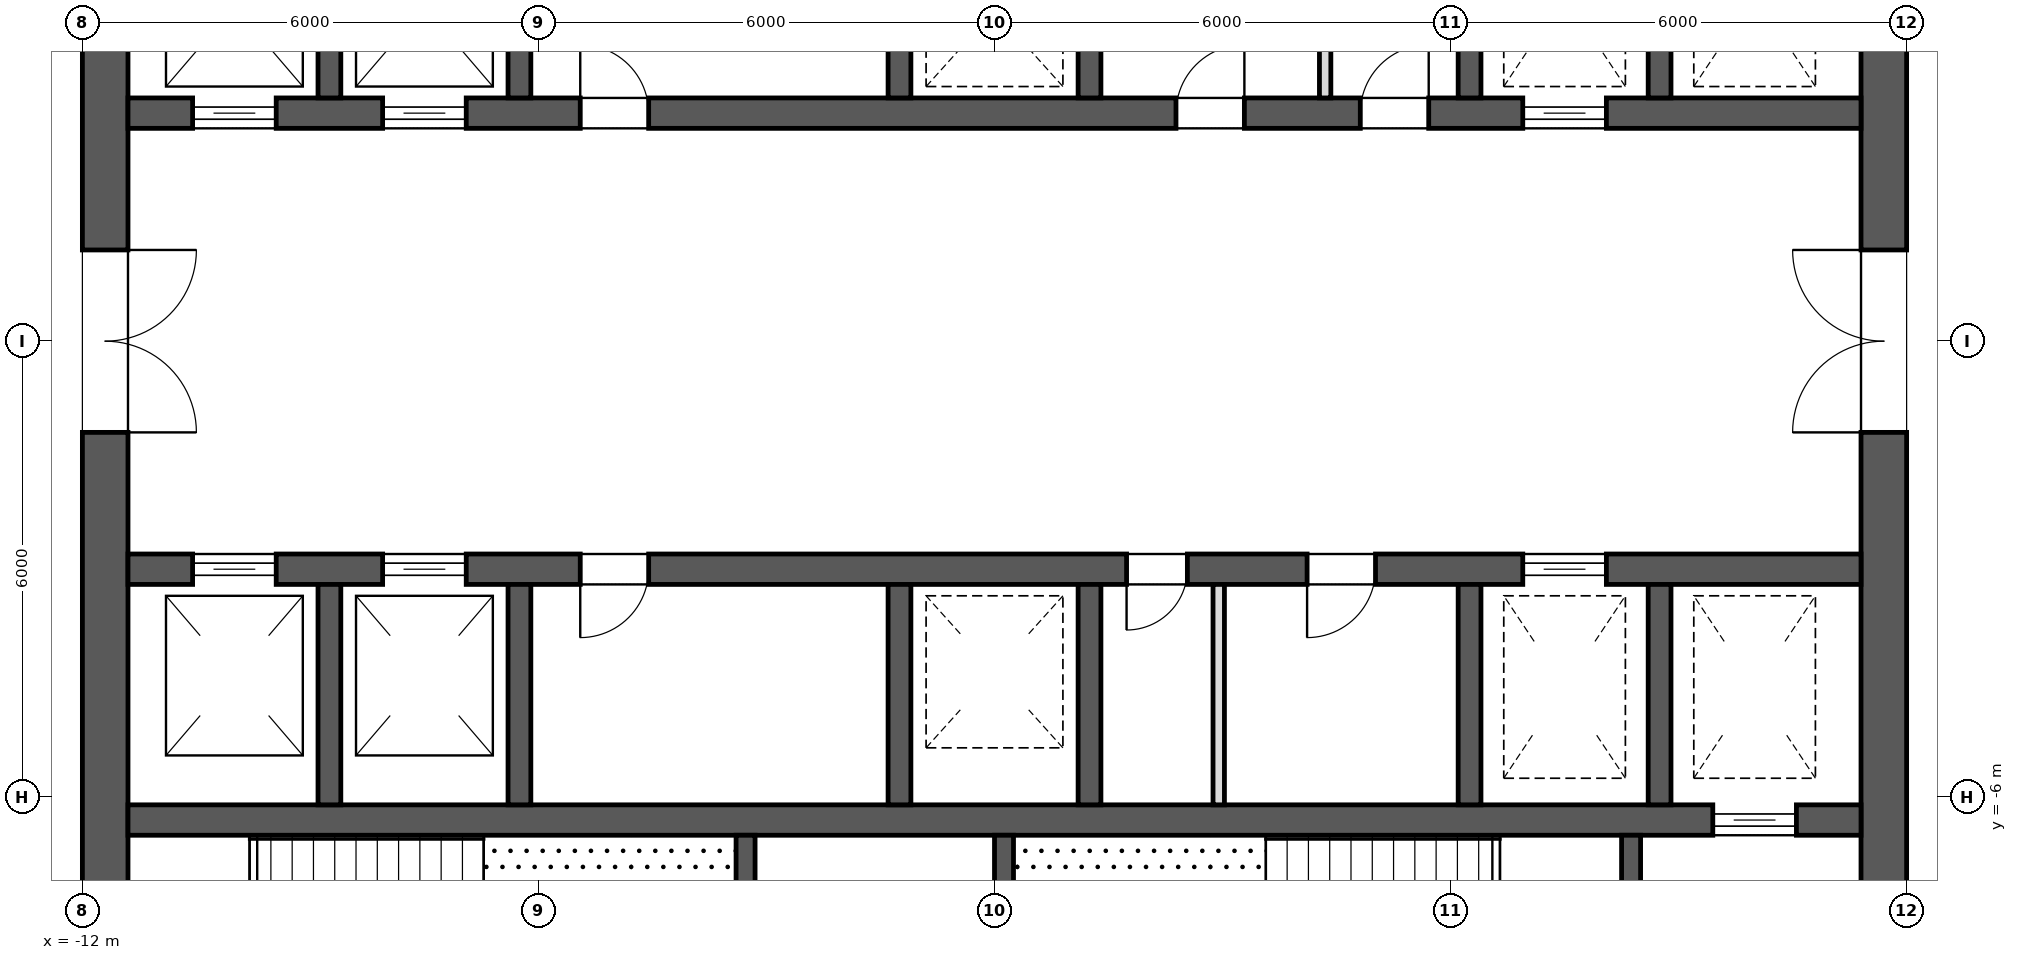
"""IFC4 building model, lengths in metres.
Left out: names, types, materials, properties, quantities, classifications, styles, units other than length and angle.
Written with IfcOpenShell. Run it as: python <this file> out.ifc"""

import sys

from ifc_helpers import new_model, si_unit, direction, frame, frame_2d, origin, place, context, subcontext, project, spatial, rectangle, extrude, element, fill, save


model = new_model("IFC4")
c1 = context("Model", 3, precision=1e-05, world=origin(), true_north=direction((0.0, 1.0)))
c2 = subcontext(c1, "Body", "Model", "MODEL_VIEW")
j1 = project(units=[si_unit("LENGTHUNIT", "METRE"), si_unit("PLANEANGLEUNIT", "RADIAN")], contexts=[c1])
p1 = place(None, origin())
s1 = spatial("IfcSite", under=j1, at=p1, CompositionType="ELEMENT")
p2 = place(p1, origin())
s2 = spatial("IfcBuilding", under=s1, at=p2, CompositionType="ELEMENT")
p3 = place(p2, frame((0.0, 0.0, 276.3)))
s3 = spatial("IfcBuildingStorey", under=s2, at=p3, CompositionType="ELEMENT", Elevation=276.3)
p4 = place(p3, frame((11.7, -11.4, 0.0), z_axis=(0.0, 0.0, 1.0), x_axis=(0.0, 1.0, 0.0)))
e1 = element("IfcWall", 1, at=p4, inside=s3, PredefinedType="SHEAR", context=c2, shape_type="SweptSolid", body=[
    extrude(rectangle(XDim=22.8, YDim=0.6, at=frame_2d((11.4, 0.0))), origin(), (0.0, 0.0, 1.0), 4.0),
])
p5 = place(p4, frame((10.2, 0.0, 0.0)))
e2 = element("IfcOpeningElement", 2, at=p5, cuts=e1, PredefinedType="OPENING", context=c2, shape_type="SweptSolid", body=[
    extrude(rectangle(XDim=2.4, YDim=2.1, at=frame_2d((1.2, 1.05))), frame((0.0, 0.312, 0.0), z_axis=(0.0, -1.0, 0.0), x_axis=(1.0, 0.0, 0.0)), (0.0, 0.0, 1.0), 0.624),
])
p6 = place(p4, frame((19.5, 0.0, 0.0)))
e3 = element("IfcOpeningElement", 3, at=p6, cuts=e1, PredefinedType="OPENING", context=c2, shape_type="SweptSolid", body=[
    extrude(rectangle(XDim=1.2, YDim=2.1, at=frame_2d((0.6, 1.05))), frame((0.0, 0.312, 0.0), z_axis=(0.0, -1.0, 0.0), x_axis=(1.0, 0.0, 0.0)), (0.0, 0.0, 1.0), 0.624),
])
p7 = place(p4, frame((2.1, 0.0, 0.0)))
e4 = element("IfcOpeningElement", 4, at=p7, cuts=e1, PredefinedType="OPENING", context=c2, shape_type="SweptSolid", body=[
    extrude(rectangle(XDim=1.2, YDim=2.1, at=frame_2d((0.6, 1.05))), frame((0.0, 0.312, 0.0), z_axis=(0.0, -1.0, 0.0), x_axis=(1.0, 0.0, 0.0)), (0.0, 0.0, 1.0), 0.624),
])
p8 = place(p3, frame((-11.7, -11.4, 0.0), z_axis=(0.0, 0.0, 1.0), x_axis=(0.0, 1.0, 0.0)))
e5 = element("IfcWall", 5, at=p8, inside=s3, PredefinedType="SHEAR", context=c2, shape_type="SweptSolid", body=[
    extrude(rectangle(XDim=22.8, YDim=0.6, at=frame_2d((11.4, 0.0))), origin(), (0.0, 0.0, 1.0), 4.0),
])
p9 = place(p8, frame((10.2, 0.0, 0.0)))
e6 = element("IfcOpeningElement", 6, at=p9, cuts=e5, PredefinedType="OPENING", context=c2, shape_type="SweptSolid", body=[
    extrude(rectangle(XDim=2.4, YDim=2.1, at=frame_2d((1.2, 1.05))), frame((0.0, 0.312, 0.0), z_axis=(0.0, -1.0, 0.0), x_axis=(1.0, 0.0, 0.0)), (0.0, 0.0, 1.0), 0.624),
])
p10 = place(p8, frame((18.925, 0.0, 0.0)))
e7 = element("IfcOpeningElement", 7, at=p10, cuts=e5, PredefinedType="OPENING", context=c2, shape_type="SweptSolid", body=[
    extrude(rectangle(XDim=1.2, YDim=2.1, at=frame_2d((0.6, 1.05))), frame((0.0, 0.312, 0.0), z_axis=(0.0, -1.0, 0.0), x_axis=(1.0, 0.0, 0.0)), (0.0, 0.0, 1.0), 0.624),
])
p11 = place(p8, frame((2.675, 0.0, 0.0)))
e8 = element("IfcOpeningElement", 8, at=p11, cuts=e5, PredefinedType="OPENING", context=c2, shape_type="SweptSolid", body=[
    extrude(rectangle(XDim=1.2, YDim=2.1, at=frame_2d((0.6, 1.05))), frame((0.0, 0.312, 0.0), z_axis=(0.0, -1.0, 0.0), x_axis=(1.0, 0.0, 0.0)), (0.0, 0.0, 1.0), 0.624),
])
p12 = place(p3, frame((-11.4, 3.0, 0.0), z_axis=(0.0, 0.0, 1.0), x_axis=(1.0, 0.0, 0.0)))
e9 = element("IfcWall", 9, at=p12, inside=s3, PredefinedType="SHEAR", context=c2, shape_type="SweptSolid", body=[
    extrude(rectangle(XDim=22.8, YDim=0.4, at=frame_2d((11.4, 0.0))), origin(), (0.0, 0.0, 1.0), 4.0),
])
p13 = place(p12, frame((0.85, 0.0, 0.0)))
e10 = element("IfcOpeningElement", 10, at=p13, cuts=e9, PredefinedType="OPENING", context=c2, shape_type="SweptSolid", body=[
    extrude(rectangle(XDim=1.1, YDim=2.1, at=frame_2d((0.55, 1.05))), frame((0.0, 0.212, 0.0), z_axis=(0.0, -1.0, 0.0), x_axis=(1.0, 0.0, 0.0)), (0.0, 0.0, 1.0), 0.424),
])
p14 = place(p12, frame((3.35, 0.0, 0.0)))
e11 = element("IfcOpeningElement", 11, at=p14, cuts=e9, PredefinedType="OPENING", context=c2, shape_type="SweptSolid", body=[
    extrude(rectangle(XDim=1.1, YDim=2.1, at=frame_2d((0.55, 1.05))), frame((0.0, 0.212, 0.0), z_axis=(0.0, -1.0, 0.0), x_axis=(1.0, 0.0, 0.0)), (0.0, 0.0, 1.0), 0.424),
])
p15 = place(p12, frame((18.35, 0.0, 0.0)))
e12 = element("IfcOpeningElement", 12, at=p15, cuts=e9, PredefinedType="OPENING", context=c2, shape_type="SweptSolid", body=[
    extrude(rectangle(XDim=1.1, YDim=2.1, at=frame_2d((0.55, 1.05))), frame((0.0, 0.212, 0.0), z_axis=(0.0, -1.0, 0.0), x_axis=(1.0, 0.0, 0.0)), (0.0, 0.0, 1.0), 0.424),
])
p16 = place(p12, frame((13.788, 0.0, 0.0)))
e13 = element("IfcOpeningElement", 13, at=p16, cuts=e9, PredefinedType="OPENING", context=c2, shape_type="SweptSolid", body=[
    extrude(rectangle(XDim=0.9, YDim=2.1, at=frame_2d((0.45, 1.05))), frame((0.0, 0.212, 0.0), z_axis=(0.0, -1.0, 0.0), x_axis=(1.0, 0.0, 0.0)), (0.0, 0.0, 1.0), 0.424),
])
p17 = place(p12, frame((16.212, 0.0, 0.0)))
e14 = element("IfcOpeningElement", 14, at=p17, cuts=e9, PredefinedType="OPENING", context=c2, shape_type="SweptSolid", body=[
    extrude(rectangle(XDim=0.9, YDim=2.1, at=frame_2d((0.45, 1.05))), frame((0.0, 0.212, 0.0), z_axis=(0.0, -1.0, 0.0), x_axis=(1.0, 0.0, 0.0)), (0.0, 0.0, 1.0), 0.424),
])
p18 = place(p12, frame((5.95, 0.0, 0.0)))
e15 = element("IfcOpeningElement", 15, at=p18, cuts=e9, PredefinedType="OPENING", context=c2, shape_type="SweptSolid", body=[
    extrude(rectangle(XDim=0.9, YDim=2.1, at=frame_2d((0.45, 1.05))), frame((0.0, 0.212, 0.0), z_axis=(0.0, -1.0, 0.0), x_axis=(1.0, 0.0, 0.0)), (0.0, 0.0, 1.0), 0.424),
])
for number, where, z_axis, x_axis in (
    (16, (-8.75, 3.2, 0.0), (0.0, 0.0, 1.0), (0.0, 1.0, 0.0)),
    (17, (-6.25, 3.2, 0.0), (0.0, 0.0, 1.0), (0.0, 1.0, 0.0)),
    (18, (-1.25, 3.2, 0.0), (0.0, 0.0, 1.0), (0.0, 1.0, 0.0)),
    (19, (1.25, 3.2, 0.0), (0.0, 0.0, 1.0), (0.0, 1.0, 0.0)),
    (20, (6.25, 3.2, 0.0), (0.0, 0.0, 1.0), (0.0, 1.0, 0.0)),
    (21, (8.75, 3.2, 0.0), (0.0, 0.0, 1.0), (0.0, 1.0, 0.0)),
):
    element("IfcWall", number, at=place(p3, frame(where, z_axis=z_axis, x_axis=x_axis)), inside=s3, PredefinedType="SHEAR", context=c2, shape_type="SweptSolid", body=[
        extrude(rectangle(XDim=2.9, YDim=0.3, at=frame_2d((1.45, 0.0))), origin(), (0.0, 0.0, 1.0), 4.0),
    ])
p19 = place(p3, frame((-11.4, -3.0, 0.0), z_axis=(0.0, 0.0, 1.0), x_axis=(1.0, 0.0, 0.0)))
e22 = element("IfcWall", 22, at=p19, inside=s3, PredefinedType="SHEAR", context=c2, shape_type="SweptSolid", body=[
    extrude(rectangle(XDim=22.8, YDim=0.4, at=frame_2d((11.4, 0.0))), origin(), (0.0, 0.0, 1.0), 4.0),
])
p20 = place(p19, frame((0.85, 0.0, 0.0)))
e23 = element("IfcOpeningElement", 23, at=p20, cuts=e22, PredefinedType="OPENING", context=c2, shape_type="SweptSolid", body=[
    extrude(rectangle(XDim=1.1, YDim=2.1, at=frame_2d((0.55, 1.05))), frame((0.0, 0.212, 0.0), z_axis=(0.0, -1.0, 0.0), x_axis=(1.0, 0.0, 0.0)), (0.0, 0.0, 1.0), 0.424),
])
p21 = place(p19, frame((3.35, 0.0, 0.0)))
e24 = element("IfcOpeningElement", 24, at=p21, cuts=e22, PredefinedType="OPENING", context=c2, shape_type="SweptSolid", body=[
    extrude(rectangle(XDim=1.1, YDim=2.1, at=frame_2d((0.55, 1.05))), frame((0.0, 0.212, 0.0), z_axis=(0.0, -1.0, 0.0), x_axis=(1.0, 0.0, 0.0)), (0.0, 0.0, 1.0), 0.424),
])
p22 = place(p19, frame((18.35, 0.0, 0.0)))
e25 = element("IfcOpeningElement", 25, at=p22, cuts=e22, PredefinedType="OPENING", context=c2, shape_type="SweptSolid", body=[
    extrude(rectangle(XDim=1.1, YDim=2.1, at=frame_2d((0.55, 1.05))), frame((0.0, 0.212, 0.0), z_axis=(0.0, -1.0, 0.0), x_axis=(1.0, 0.0, 0.0)), (0.0, 0.0, 1.0), 0.424),
])
p23 = place(p19, frame((13.137, 0.0, 0.0)))
e26 = element("IfcOpeningElement", 26, at=p23, cuts=e22, PredefinedType="OPENING", context=c2, shape_type="SweptSolid", body=[
    extrude(rectangle(XDim=0.8, YDim=2.1, at=frame_2d((0.4, 1.05))), frame((0.0, 0.212, 0.0), z_axis=(0.0, -1.0, 0.0), x_axis=(1.0, 0.0, 0.0)), (0.0, 0.0, 1.0), 0.424),
])
p24 = place(p19, frame((15.512, 0.0, 0.0)))
e27 = element("IfcOpeningElement", 27, at=p24, cuts=e22, PredefinedType="OPENING", context=c2, shape_type="SweptSolid", body=[
    extrude(rectangle(XDim=0.9, YDim=2.1, at=frame_2d((0.45, 1.05))), frame((0.0, 0.212, 0.0), z_axis=(0.0, -1.0, 0.0), x_axis=(1.0, 0.0, 0.0)), (0.0, 0.0, 1.0), 0.424),
])
p25 = place(p19, frame((5.95, 0.0, 0.0)))
e28 = element("IfcOpeningElement", 28, at=p25, cuts=e22, PredefinedType="OPENING", context=c2, shape_type="SweptSolid", body=[
    extrude(rectangle(XDim=0.9, YDim=2.1, at=frame_2d((0.45, 1.05))), frame((0.0, 0.212, 0.0), z_axis=(0.0, -1.0, 0.0), x_axis=(1.0, 0.0, 0.0)), (0.0, 0.0, 1.0), 0.424),
])
p26 = place(p3, frame((-11.4, -6.3, 0.0), z_axis=(0.0, 0.0, 1.0), x_axis=(1.0, 0.0, 0.0)))
e29 = element("IfcWall", 29, at=p26, inside=s3, PredefinedType="SHEAR", context=c2, shape_type="SweptSolid", body=[
    extrude(rectangle(XDim=22.8, YDim=0.4, at=frame_2d((11.4, 0.0))), origin(), (0.0, 0.0, 1.0), 4.0),
])
p27 = place(p26, frame((20.85, 0.0, 0.0)))
e30 = element("IfcOpeningElement", 30, at=p27, cuts=e29, PredefinedType="OPENING", context=c2, shape_type="SweptSolid", body=[
    extrude(rectangle(XDim=1.1, YDim=2.1, at=frame_2d((0.55, 1.05))), frame((0.0, 0.212, 0.0), z_axis=(0.0, -1.0, 0.0), x_axis=(1.0, 0.0, 0.0)), (0.0, 0.0, 1.0), 0.424),
])
for number, where, z_axis, x_axis in (
    (31, (-8.75, -6.1, 0.0), (0.0, 0.0, 1.0), (0.0, 1.0, 0.0)),
    (32, (-6.25, -6.1, 0.0), (0.0, 0.0, 1.0), (0.0, 1.0, 0.0)),
    (33, (-1.25, -6.1, 0.0), (0.0, 0.0, 1.0), (0.0, 1.0, 0.0)),
    (34, (1.25, -6.1, 0.0), (0.0, 0.0, 1.0), (0.0, 1.0, 0.0)),
    (35, (6.25, -6.1, 0.0), (0.0, 0.0, 1.0), (0.0, 1.0, 0.0)),
    (36, (8.75, -6.1, 0.0), (0.0, 0.0, 1.0), (0.0, 1.0, 0.0)),
):
    element("IfcWall", number, at=place(p3, frame(where, z_axis=z_axis, x_axis=x_axis)), inside=s3, PredefinedType="SHEAR", context=c2, shape_type="SweptSolid", body=[
        extrude(rectangle(XDim=2.9, YDim=0.3, at=frame_2d((1.45, 0.0))), origin(), (0.0, 0.0, 1.0), 4.0),
    ])
for number, where, z_axis, x_axis in (
    (37, (-3.275, -11.4, 0.0), (0.0, 0.0, 1.0), (0.0, 1.0, 0.0)),
    (38, (0.125, -11.4, 0.0), (0.0, 0.0, 1.0), (0.0, 1.0, 0.0)),
):
    element("IfcWall", number, at=place(p3, frame(where, z_axis=z_axis, x_axis=x_axis)), inside=s3, PredefinedType="SHEAR", context=c2, shape_type="SweptSolid", body=[
        extrude(rectangle(XDim=4.9, YDim=0.25, at=frame_2d((2.45, 0.0))), origin(), (0.0, 0.0, 1.0), 3.7),
    ])
p28 = place(p3, frame((8.375, -9.9, 0.0), z_axis=(0.0, 0.0, 1.0), x_axis=(0.0, 1.0, 0.0)))
e39 = element("IfcWall", 39, at=p28, inside=s3, PredefinedType="SHEAR", context=c2, shape_type="SweptSolid", body=[
    extrude(rectangle(XDim=3.4, YDim=0.25, at=frame_2d((1.7, 0.0))), origin(), (0.0, 0.0, 1.0), 3.7),
])
p29 = place(p28, frame((1.175, 0.0, 0.0)))
e40 = element("IfcOpeningElement", 40, at=p29, cuts=e39, PredefinedType="OPENING", context=c2, shape_type="SweptSolid", body=[
    extrude(rectangle(XDim=1.2, YDim=2.1, at=frame_2d((0.6, 1.05))), frame((0.0, 0.137, 0.0), z_axis=(0.0, -1.0, 0.0), x_axis=(1.0, 0.0, 0.0)), (0.0, 0.0, 1.0), 0.274),
])
for number, where, z_axis, x_axis in (
    (41, (4.35, 3.2, 0.0), (0.0, 0.0, 1.0), (0.0, 1.0, 0.0)),
    (42, (2.95, -6.1, 0.0), (0.0, 0.0, 1.0), (0.0, 1.0, 0.0)),
):
    element("IfcWall", number, at=place(p3, frame(where, z_axis=z_axis, x_axis=x_axis)), inside=s3, PredefinedType="PARTITIONING", context=c2, shape_type="SweptSolid", body=[
        extrude(rectangle(XDim=2.9, YDim=0.15, at=frame_2d((1.45, 0.0))), origin(), (0.0, 0.0, 1.0), 3.7),
    ])
p30 = place(p27, origin())
e43 = element("IfcDoor", 43, at=p30, inside=s3, OperationType="SLIDING_TO_LEFT", PredefinedType="DOOR", context=c2, shape_type="SweptSolid", body=[
    extrude(rectangle(XDim=1.1, YDim=2.1, at=frame_2d((0.55, 1.05))), frame((0.0, 0.025, 0.0), z_axis=(0.0, -1.0, 0.0), x_axis=(1.0, 0.0, 0.0)), (0.0, 0.0, 1.0), 0.05),
])
fill(e30, e43)
p31 = place(p13, origin())
e44 = element("IfcDoor", 44, at=p31, inside=s3, OperationType="SLIDING_TO_LEFT", PredefinedType="DOOR", context=c2, shape_type="SweptSolid", body=[
    extrude(rectangle(XDim=1.1, YDim=2.1, at=frame_2d((0.55, 1.05))), frame((0.0, 0.025, 0.0), z_axis=(0.0, -1.0, 0.0), x_axis=(1.0, 0.0, 0.0)), (0.0, 0.0, 1.0), 0.05),
])
fill(e10, e44)
p32 = place(p14, origin())
e45 = element("IfcDoor", 45, at=p32, inside=s3, OperationType="SLIDING_TO_LEFT", PredefinedType="DOOR", context=c2, shape_type="SweptSolid", body=[
    extrude(rectangle(XDim=1.1, YDim=2.1, at=frame_2d((0.55, 1.05))), frame((0.0, 0.025, 0.0), z_axis=(0.0, -1.0, 0.0), x_axis=(1.0, 0.0, 0.0)), (0.0, 0.0, 1.0), 0.05),
])
fill(e11, e45)
p33 = place(p20, origin())
e46 = element("IfcDoor", 46, at=p33, inside=s3, OperationType="SLIDING_TO_LEFT", PredefinedType="DOOR", context=c2, shape_type="SweptSolid", body=[
    extrude(rectangle(XDim=1.1, YDim=2.1, at=frame_2d((0.55, 1.05))), frame((0.0, 0.025, 0.0), z_axis=(0.0, -1.0, 0.0), x_axis=(1.0, 0.0, 0.0)), (0.0, 0.0, 1.0), 0.05),
])
fill(e23, e46)
p34 = place(p21, origin())
e47 = element("IfcDoor", 47, at=p34, inside=s3, OperationType="SLIDING_TO_LEFT", PredefinedType="DOOR", context=c2, shape_type="SweptSolid", body=[
    extrude(rectangle(XDim=1.1, YDim=2.1, at=frame_2d((0.55, 1.05))), frame((0.0, 0.025, 0.0), z_axis=(0.0, -1.0, 0.0), x_axis=(1.0, 0.0, 0.0)), (0.0, 0.0, 1.0), 0.05),
])
fill(e24, e47)
p35 = place(p15, origin())
e48 = element("IfcDoor", 48, at=p35, inside=s3, OperationType="SLIDING_TO_LEFT", PredefinedType="DOOR", context=c2, shape_type="SweptSolid", body=[
    extrude(rectangle(XDim=1.1, YDim=2.1, at=frame_2d((0.55, 1.05))), frame((0.0, 0.025, 0.0), z_axis=(0.0, -1.0, 0.0), x_axis=(1.0, 0.0, 0.0)), (0.0, 0.0, 1.0), 0.05),
])
fill(e12, e48)
p36 = place(p22, origin())
e49 = element("IfcDoor", 49, at=p36, inside=s3, OperationType="SLIDING_TO_LEFT", PredefinedType="DOOR", context=c2, shape_type="SweptSolid", body=[
    extrude(rectangle(XDim=1.1, YDim=2.1, at=frame_2d((0.55, 1.05))), frame((0.0, 0.025, 0.0), z_axis=(0.0, -1.0, 0.0), x_axis=(1.0, 0.0, 0.0)), (0.0, 0.0, 1.0), 0.05),
])
fill(e25, e49)
p37 = place(p9, frame((2.4, 0.0, 0.0), z_axis=(0.0, 0.0, 1.0), x_axis=(-1.0, 0.0, 0.0)))
e50 = element("IfcDoor", 50, at=p37, inside=s3, OperationType="DOUBLE_DOOR_SINGLE_SWING", PredefinedType="DOOR", context=c2, shape_type="SweptSolid", body=[
    extrude(rectangle(XDim=2.4, YDim=2.1, at=frame_2d((1.2, 1.05))), frame((0.0, 0.025, 0.0), z_axis=(0.0, -1.0, 0.0), x_axis=(1.0, 0.0, 0.0)), (0.0, 0.0, 1.0), 0.05),
])
fill(e6, e50)
p38 = place(p5, origin())
e51 = element("IfcDoor", 51, at=p38, inside=s3, OperationType="DOUBLE_DOOR_SINGLE_SWING", PredefinedType="DOOR", context=c2, shape_type="SweptSolid", body=[
    extrude(rectangle(XDim=2.4, YDim=2.1, at=frame_2d((1.2, 1.05))), frame((0.0, 0.025, 0.0), z_axis=(0.0, -1.0, 0.0), x_axis=(1.0, 0.0, 0.0)), (0.0, 0.0, 1.0), 0.05),
])
fill(e2, e51)
p39 = place(p16, origin())
e52 = element("IfcDoor", 52, at=p39, inside=s3, OperationType="SINGLE_SWING_LEFT", PredefinedType="DOOR", context=c2, shape_type="SweptSolid", body=[
    extrude(rectangle(XDim=0.9, YDim=2.1, at=frame_2d((0.45, 1.05))), frame((0.0, 0.025, 0.0), z_axis=(0.0, -1.0, 0.0), x_axis=(1.0, 0.0, 0.0)), (0.0, 0.0, 1.0), 0.05),
])
fill(e13, e52)
p40 = place(p17, origin())
e53 = element("IfcDoor", 53, at=p40, inside=s3, OperationType="SINGLE_SWING_LEFT", PredefinedType="DOOR", context=c2, shape_type="SweptSolid", body=[
    extrude(rectangle(XDim=0.9, YDim=2.1, at=frame_2d((0.45, 1.05))), frame((0.0, 0.025, 0.0), z_axis=(0.0, -1.0, 0.0), x_axis=(1.0, 0.0, 0.0)), (0.0, 0.0, 1.0), 0.05),
])
fill(e14, e53)
p41 = place(p18, origin())
e54 = element("IfcDoor", 54, at=p41, inside=s3, OperationType="SINGLE_SWING_RIGHT", PredefinedType="DOOR", context=c2, shape_type="SweptSolid", body=[
    extrude(rectangle(XDim=0.9, YDim=2.1, at=frame_2d((0.45, 1.05))), frame((0.0, 0.025, 0.0), z_axis=(0.0, -1.0, 0.0), x_axis=(1.0, 0.0, 0.0)), (0.0, 0.0, 1.0), 0.05),
])
fill(e15, e54)
p42 = place(p23, frame((0.8, 0.0, 0.0), z_axis=(0.0, 0.0, 1.0), x_axis=(-1.0, 0.0, 0.0)))
e55 = element("IfcDoor", 55, at=p42, inside=s3, OperationType="SINGLE_SWING_LEFT", PredefinedType="DOOR", context=c2, shape_type="SweptSolid", body=[
    extrude(rectangle(XDim=0.8, YDim=2.1, at=frame_2d((0.4, 1.05))), frame((0.0, 0.025, 0.0), z_axis=(0.0, -1.0, 0.0), x_axis=(1.0, 0.0, 0.0)), (0.0, 0.0, 1.0), 0.05),
])
fill(e26, e55)
p43 = place(p24, frame((0.9, 0.0, 0.0), z_axis=(0.0, 0.0, 1.0), x_axis=(-1.0, 0.0, 0.0)))
e56 = element("IfcDoor", 56, at=p43, inside=s3, OperationType="SINGLE_SWING_LEFT", PredefinedType="DOOR", context=c2, shape_type="SweptSolid", body=[
    extrude(rectangle(XDim=0.9, YDim=2.1, at=frame_2d((0.45, 1.05))), frame((0.0, 0.025, 0.0), z_axis=(0.0, -1.0, 0.0), x_axis=(1.0, 0.0, 0.0)), (0.0, 0.0, 1.0), 0.05),
])
fill(e27, e56)
p44 = place(p25, frame((0.9, 0.0, 0.0), z_axis=(0.0, 0.0, 1.0), x_axis=(-1.0, 0.0, 0.0)))
e57 = element("IfcDoor", 57, at=p44, inside=s3, OperationType="SINGLE_SWING_LEFT", PredefinedType="DOOR", context=c2, shape_type="SweptSolid", body=[
    extrude(rectangle(XDim=0.9, YDim=2.1, at=frame_2d((0.45, 1.05))), frame((0.0, 0.025, 0.0), z_axis=(0.0, -1.0, 0.0), x_axis=(1.0, 0.0, 0.0)), (0.0, 0.0, 1.0), 0.05),
])
fill(e28, e57)
save(model, sys.argv[1])
